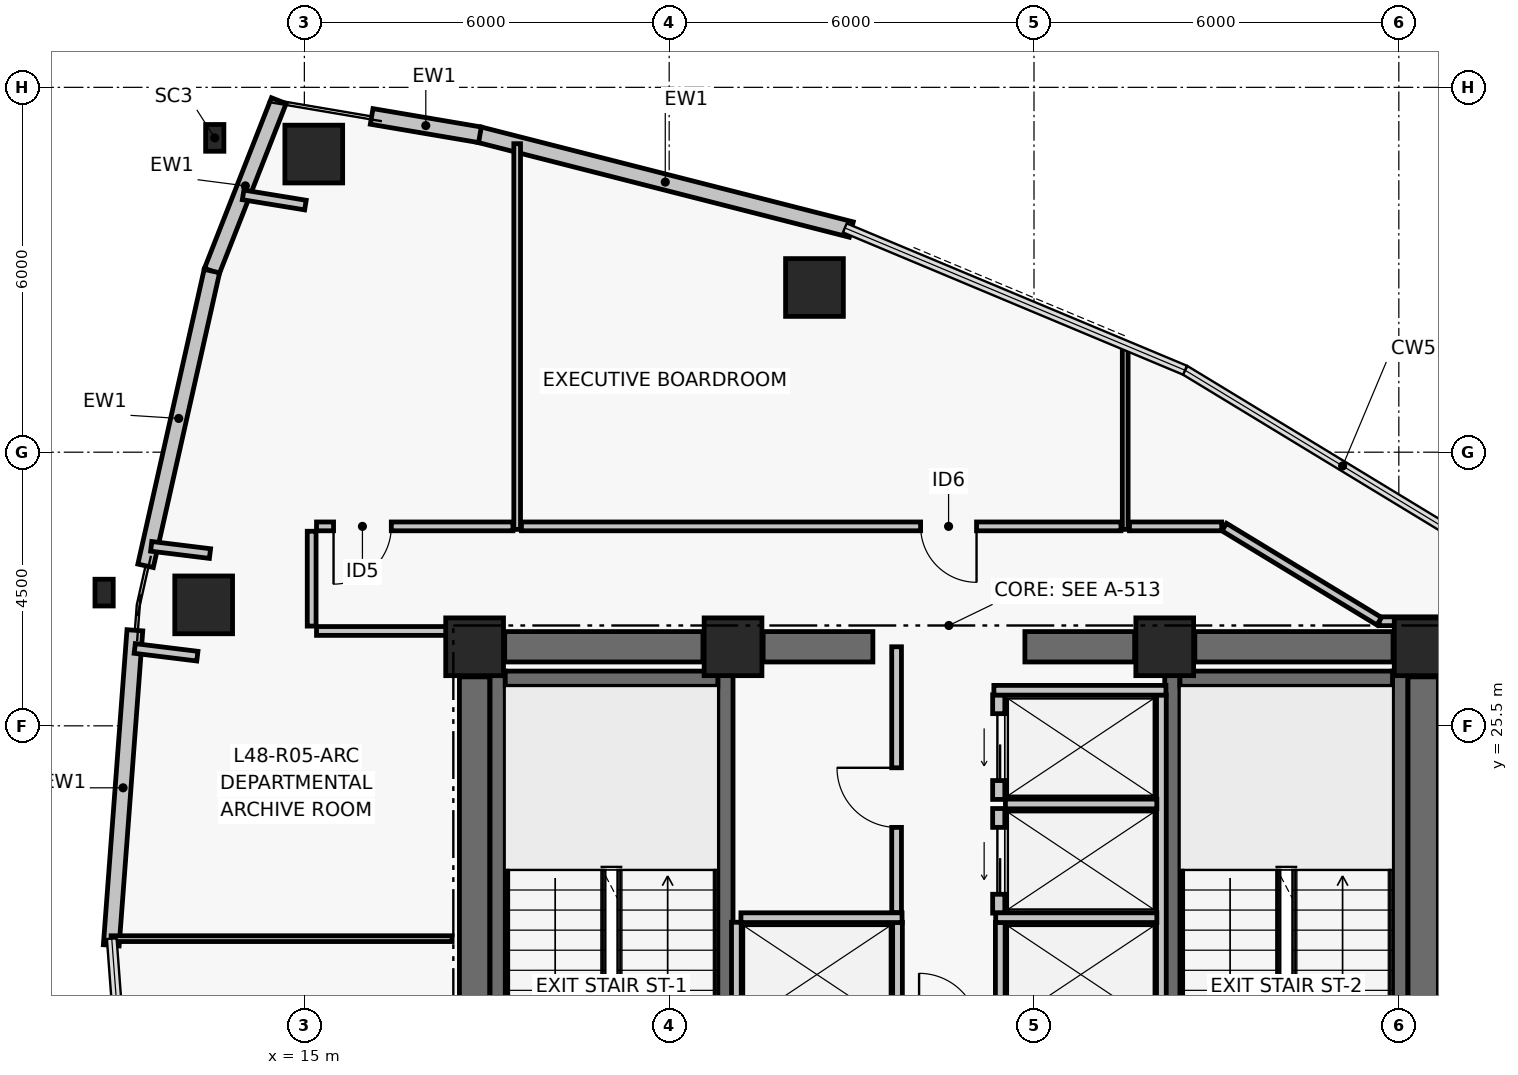
"""IFC4 building model, lengths in metres.
Left out: names, types, materials, properties, quantities, classifications, styles, units other than length and angle.
Written with IfcOpenShell. Run it as: python <this file> out.ifc"""

import sys

from ifc_helpers import new_model, si_unit, direction, frame, frame_2d, origin, origin_2d, place, context, subcontext, project, spatial, rectangle, hollow_rectangle, i_section, extrude, element, fill, save


model = new_model("IFC4")
c1 = context("Model", 3, precision=1e-05, world=origin(), true_north=direction((0.0, 1.0)))
c2 = subcontext(c1, "Body", "Model", "MODEL_VIEW")
j1 = project(units=[si_unit("LENGTHUNIT", "METRE"), si_unit("PLANEANGLEUNIT", "RADIAN")], contexts=[c1])
p1 = place(None, origin())
s1 = spatial("IfcSite", under=j1, at=p1, CompositionType="ELEMENT")
p2 = place(p1, origin())
s2 = spatial("IfcBuilding", under=s1, at=p2, CompositionType="ELEMENT")
p3 = place(p2, frame((0.0, 0.0, 191.52)))
s3 = spatial("IfcBuildingStorey", under=s2, at=p3, CompositionType="ELEMENT", Elevation=191.52)
for number, where, z_axis, x_axis in (
    (1, (17.8, 26.8, 0.0), (0.0, 0.0, 1.0), (1.0, 0.0, 0.0)),
    (2, (22.05, 26.8, 0.0), (0.0, 0.0, 1.0), (1.0, 0.0, 0.0)),
    (3, (29.15, 26.8, 0.0), (0.0, 0.0, 1.0), (1.0, 0.0, 0.0)),
    (4, (33.4, 26.8, 0.0), (0.0, 0.0, 1.0), (1.0, 0.0, 0.0)),
):
    element("IfcColumn", number, at=place(p3, frame(where, z_axis=z_axis, x_axis=x_axis)), inside=s3, PredefinedType="COLUMN", context=c2, shape_type="SweptSolid", body=[
        extrude(rectangle(XDim=0.95, YDim=0.95, at=origin_2d()), origin(), (0.0, 0.0, 1.0), 3.72),
    ])
p4 = place(p3, frame((18.295, 26.8, 0.0), z_axis=(0.0, 0.0, 1.0), x_axis=(1.0, 0.0, 0.0)))
e5 = element("IfcWall", 5, at=p4, inside=s3, PredefinedType="SHEAR", context=c2, shape_type="SweptSolid", body=[
    extrude(rectangle(XDim=3.26, YDim=0.5, at=frame_2d((1.63, 0.0))), origin(), (0.0, 0.0, 1.0), 3.44),
])
p5 = place(p3, frame((22.545, 26.8, 0.0), z_axis=(0.0, 0.0, 1.0), x_axis=(1.0, 0.0, 0.0)))
e6 = element("IfcWall", 6, at=p5, inside=s3, PredefinedType="SHEAR", context=c2, shape_type="SweptSolid", body=[
    extrude(rectangle(XDim=1.805, YDim=0.5, at=frame_2d((0.903, 0.0))), origin(), (0.0, 0.0, 1.0), 3.44),
])
p6 = place(p3, frame((26.85, 26.8, 0.0), z_axis=(0.0, 0.0, 1.0), x_axis=(1.0, 0.0, 0.0)))
e7 = element("IfcWall", 7, at=p6, inside=s3, PredefinedType="SHEAR", context=c2, shape_type="SweptSolid", body=[
    extrude(rectangle(XDim=1.805, YDim=0.5, at=frame_2d((0.902, 0.0))), origin(), (0.0, 0.0, 1.0), 3.44),
])
p7 = place(p3, frame((29.645, 26.8, 0.0), z_axis=(0.0, 0.0, 1.0), x_axis=(1.0, 0.0, 0.0)))
e8 = element("IfcWall", 8, at=p7, inside=s3, PredefinedType="SHEAR", context=c2, shape_type="SweptSolid", body=[
    extrude(rectangle(XDim=3.26, YDim=0.5, at=frame_2d((1.63, 0.0))), origin(), (0.0, 0.0, 1.0), 3.44),
])
for number, where, z_axis, x_axis in (
    (9, (17.8, 17.695, 0.0), (0.0, 0.0, 1.0), (0.0, 1.0, 0.0)),
    (10, (33.4, 17.695, 0.0), (0.0, 0.0, 1.0), (0.0, 1.0, 0.0)),
):
    element("IfcWall", number, at=place(p3, frame(where, z_axis=z_axis, x_axis=x_axis)), inside=s3, PredefinedType="SHEAR", context=c2, shape_type="SweptSolid", body=[
        extrude(rectangle(XDim=8.61, YDim=0.5, at=frame_2d((4.305, 0.0))), origin(), (0.0, 0.0, 1.0), 3.44),
    ])
p8 = place(p3, frame((18.179, 17.6, 0.0), z_axis=(0.0, 0.0, 1.0), x_axis=(0.0, 1.0, 0.0)))
e11 = element("IfcWall", 11, at=p8, inside=s3, PredefinedType="SHEAR", context=c2, shape_type="SweptSolid", body=[
    extrude(rectangle(XDim=8.8, YDim=0.25, at=frame_2d((4.4, 0.0))), origin(), (0.0, 0.0, 1.0), 3.44),
])
p9 = place(p3, frame((21.925, 17.6, 0.0), z_axis=(0.0, 0.0, 1.0), x_axis=(0.0, 1.0, 0.0)))
e12 = element("IfcWall", 12, at=p9, inside=s3, PredefinedType="SHEAR", context=c2, shape_type="SweptSolid", body=[
    extrude(rectangle(XDim=8.8, YDim=0.25, at=frame_2d((4.4, 0.0))), origin(), (0.0, 0.0, 1.0), 3.44),
])
p10 = place(p9, frame((0.35, 0.0, 0.0)))
e13 = element("IfcOpeningElement", 13, at=p10, cuts=e12, PredefinedType="OPENING", context=c2, shape_type="SweptSolid", body=[
    extrude(rectangle(XDim=1.05, YDim=2.08, at=frame_2d((0.525, 1.04))), frame((0.0, 0.135, 0.0), z_axis=(0.0, -1.0, 0.0), x_axis=(1.0, 0.0, 0.0)), (0.0, 0.0, 1.0), 0.27),
])
p11 = place(p3, frame((18.304, 26.275, 0.0), z_axis=(0.0, 0.0, 1.0), x_axis=(1.0, 0.0, 0.0)))
e14 = element("IfcWall", 14, at=p11, inside=s3, PredefinedType="SHEAR", context=c2, shape_type="SweptSolid", body=[
    extrude(rectangle(XDim=3.496, YDim=0.25, at=frame_2d((1.748, 0.0))), origin(), (0.0, 0.0, 1.0), 3.44),
])
p12 = place(p3, frame((29.275, 17.6, 0.0), z_axis=(0.0, 0.0, 1.0), x_axis=(0.0, 1.0, 0.0)))
e15 = element("IfcWall", 15, at=p12, inside=s3, PredefinedType="SHEAR", context=c2, shape_type="SweptSolid", body=[
    extrude(rectangle(XDim=8.8, YDim=0.25, at=frame_2d((4.4, 0.0))), origin(), (0.0, 0.0, 1.0), 3.44),
])
p13 = place(p12, frame((0.35, 0.0, 0.0)))
e16 = element("IfcOpeningElement", 16, at=p13, cuts=e15, PredefinedType="OPENING", context=c2, shape_type="SweptSolid", body=[
    extrude(rectangle(XDim=1.05, YDim=2.08, at=frame_2d((0.525, 1.04))), frame((0.0, 0.135, 0.0), z_axis=(0.0, -1.0, 0.0), x_axis=(1.0, 0.0, 0.0)), (0.0, 0.0, 1.0), 0.27),
])
p14 = place(p3, frame((33.021, 17.6, 0.0), z_axis=(0.0, 0.0, 1.0), x_axis=(0.0, 1.0, 0.0)))
e17 = element("IfcWall", 17, at=p14, inside=s3, PredefinedType="SHEAR", context=c2, shape_type="SweptSolid", body=[
    extrude(rectangle(XDim=8.8, YDim=0.25, at=frame_2d((4.4, 0.0))), origin(), (0.0, 0.0, 1.0), 3.44),
])
p15 = place(p3, frame((29.4, 26.275, 0.0), z_axis=(0.0, 0.0, 1.0), x_axis=(1.0, 0.0, 0.0)))
e18 = element("IfcWall", 18, at=p15, inside=s3, PredefinedType="SHEAR", context=c2, shape_type="SweptSolid", body=[
    extrude(rectangle(XDim=3.496, YDim=0.25, at=frame_2d((1.748, 0.0))), origin(), (0.0, 0.0, 1.0), 3.44),
])
for number, where, z_axis, x_axis in (
    (19, (23.389, 32.708, 0.0), (0.0, 0.0, 1.0), (1.0, 0.0, 0.0)),
    (20, (15.155, 34.903, 0.0), (0.0, 0.0, 1.0), (1.0, 0.0, 0.0)),
    (21, (13.344, 27.489, 0.0), (0.0, 0.0, 1.0), (1.0, 0.0, 0.0)),
):
    element("IfcColumn", number, at=place(p3, frame(where, z_axis=z_axis, x_axis=x_axis)), inside=s3, PredefinedType="COLUMN", context=c2, shape_type="SweptSolid", body=[
        extrude(hollow_rectangle(XDim=0.95, YDim=0.95, WallThickness=0.04, at=origin_2d()), origin(), (0.0, 0.0, 1.0), 3.72),
    ])
p16 = place(p3, frame((13.526, 35.169, 0.99), z_axis=(-0.984034614724, 0.160999980635, 0.075860946873), x_axis=(-0.16146525786, -0.98687839702, 0.0)))
e22 = element("IfcColumn", 22, at=p16, inside=s3, PredefinedType="COLUMN", context=c2, shape_type="SweptSolid", body=[
    extrude(i_section(OverallWidth=0.3, OverallDepth=0.44, WebThickness=0.011, FlangeThickness=0.018, at=origin_2d()), origin(), (0.0, 0.0, 1.0), 13.578),
])
p17 = place(p3, frame((11.706, 27.691, 0.99), z_axis=(-0.987092081771, 0.121459707467, 0.104387554656), x_axis=(-0.122126924057, -0.992514490786, 0.0)))
e23 = element("IfcColumn", 23, at=p17, inside=s3, PredefinedType="COLUMN", context=c2, shape_type="SweptSolid", body=[
    extrude(i_section(OverallWidth=0.3, OverallDepth=0.44, WebThickness=0.011, FlangeThickness=0.018, at=origin_2d()), origin(), (0.0, 0.0, 1.0), 9.867),
])
p18 = place(p3, frame((17.876, 35.222, 0.0), z_axis=(0.0, 0.0, 1.0), x_axis=(0.968976240439, -0.247153890246, 0.0)))
e24 = element("IfcWall", 24, at=p18, inside=s3, PredefinedType="PARTITIONING", context=c2, shape_type="SweptSolid", body=[
    extrude(rectangle(XDim=6.315, YDim=0.26, at=frame_2d((3.157, 0.0))), origin(), (0.0, 0.0, 1.0), 3.44),
])
p19 = place(p3, frame((16.107, 35.522, 0.0), z_axis=(0.0, 0.0, 1.0), x_axis=(0.985877723898, -0.167466753484, 0.0)))
e25 = element("IfcWall", 25, at=p19, inside=s3, PredefinedType="PARTITIONING", context=c2, shape_type="SweptSolid", body=[
    extrude(rectangle(XDim=1.806, YDim=0.26, at=frame_2d((0.903, 0.0))), origin(), (0.0, 0.0, 1.0), 3.44),
])
p20 = place(p3, frame((13.479, 32.979, 0.0), z_axis=(0.0, 0.0, 1.0), x_axis=(0.365609724313, 0.930768246927, 0.0)))
e26 = element("IfcWall", 26, at=p20, inside=s3, PredefinedType="PARTITIONING", context=c2, shape_type="SweptSolid", body=[
    extrude(rectangle(XDim=3.011, YDim=0.26, at=frame_2d((1.505, 0.0))), origin(), (0.0, 0.0, 1.0), 1.8),
])
p21 = place(p3, frame((12.389, 28.132, 0.0), z_axis=(0.0, 0.0, 1.0), x_axis=(0.219479451471, 0.975617122842, 0.0)))
e27 = element("IfcWall", 27, at=p21, inside=s3, PredefinedType="PARTITIONING", context=c2, shape_type="SweptSolid", body=[
    extrude(rectangle(XDim=4.968, YDim=0.26, at=frame_2d((2.484, 0.0))), origin(), (0.0, 0.0, 1.0), 3.44),
])
p22 = place(p3, frame((11.824, 21.89, 0.0), z_axis=(0.0, 0.0, 1.0), x_axis=(0.074763079383, 0.997201324689, 0.0)))
e28 = element("IfcWall", 28, at=p22, inside=s3, PredefinedType="PARTITIONING", context=c2, shape_type="SweptSolid", body=[
    extrude(rectangle(XDim=5.196, YDim=0.26, at=frame_2d((2.598, 0.0))), origin(), (0.0, 0.0, 1.0), 3.44),
])
p23 = place(p3, frame((26.42, 22.42, 0.0), z_axis=(0.0, 0.0, 1.0), x_axis=(0.0, 1.0, 0.0)))
e29 = element("IfcWall", 29, at=p23, inside=s3, PredefinedType="PARTITIONING", context=c2, shape_type="SweptSolid", body=[
    extrude(rectangle(XDim=1.72, YDim=0.2, at=frame_2d((0.86, 0.0))), origin(), (0.0, 0.0, 1.0), 3.44),
])
p24 = place(p23, frame((0.31, 0.0, 0.0)))
e30 = element("IfcOpeningElement", 30, at=p24, cuts=e29, PredefinedType="OPENING", context=c2, shape_type="SweptSolid", body=[
    extrude(rectangle(XDim=1.1, YDim=2.08, at=frame_2d((0.55, 1.04))), frame((0.0, 0.11, 0.0), z_axis=(0.0, -1.0, 0.0), x_axis=(1.0, 0.0, 0.0)), (0.0, 0.0, 1.0), 0.22),
])
p25 = place(p3, frame((26.42, 24.29, 0.0), z_axis=(0.0, 0.0, 1.0), x_axis=(0.0, 1.0, 0.0)))
e31 = element("IfcWall", 31, at=p25, inside=s3, PredefinedType="PARTITIONING", context=c2, shape_type="SweptSolid", body=[
    extrude(rectangle(XDim=1.72, YDim=0.2, at=frame_2d((0.86, 0.0))), origin(), (0.0, 0.0, 1.0), 3.44),
])
p26 = place(p25, frame((0.31, 0.0, 0.0)))
e32 = element("IfcOpeningElement", 32, at=p26, cuts=e31, PredefinedType="OPENING", context=c2, shape_type="SweptSolid", body=[
    extrude(rectangle(XDim=1.1, YDim=2.08, at=frame_2d((0.55, 1.04))), frame((0.0, 0.11, 0.0), z_axis=(0.0, -1.0, 0.0), x_axis=(1.0, 0.0, 0.0)), (0.0, 0.0, 1.0), 0.22),
])
for number, where, z_axis, x_axis in (
    (33, (22.105, 20.56, 0.0), (0.0, 0.0, 1.0), (0.0, 1.0, 0.0)),
    (34, (24.755, 20.56, 0.0), (0.0, 0.0, 1.0), (0.0, 1.0, 0.0)),
):
    element("IfcWall", number, at=place(p3, frame(where, z_axis=z_axis, x_axis=x_axis)), inside=s3, PredefinedType="PARTITIONING", context=c2, shape_type="SweptSolid", body=[
        extrude(rectangle(XDim=1.71, YDim=0.16, at=frame_2d((0.855, 0.0))), origin(), (0.0, 0.0, 1.0), 3.44),
    ])
p27 = place(p3, frame((22.18, 22.345, 0.0), z_axis=(0.0, 0.0, 1.0), x_axis=(1.0, 0.0, 0.0)))
e35 = element("IfcWall", 35, at=p27, inside=s3, PredefinedType="PARTITIONING", context=c2, shape_type="SweptSolid", body=[
    extrude(rectangle(XDim=2.65, YDim=0.16, at=frame_2d((1.325, 0.0))), origin(), (0.0, 0.0, 1.0), 3.44),
])
p28 = place(p3, frame((29.095, 20.56, 0.0), z_axis=(0.0, 0.0, 1.0), x_axis=(0.0, 1.0, 0.0)))
e36 = element("IfcWall", 36, at=p28, inside=s3, PredefinedType="PARTITIONING", context=c2, shape_type="SweptSolid", body=[
    extrude(rectangle(XDim=5.45, YDim=0.16, at=frame_2d((2.725, 0.0))), origin(), (0.0, 0.0, 1.0), 3.44),
])
p29 = place(p3, frame((26.445, 20.56, 0.0), z_axis=(0.0, 0.0, 1.0), x_axis=(0.0, 1.0, 0.0)))
e37 = element("IfcWall", 37, at=p29, inside=s3, PredefinedType="PARTITIONING", context=c2, shape_type="SweptSolid", body=[
    extrude(rectangle(XDim=1.71, YDim=0.16, at=frame_2d((0.855, 0.0))), origin(), (0.0, 0.0, 1.0), 3.44),
])
p30 = place(p3, frame((26.37, 22.345, 0.0), z_axis=(0.0, 0.0, 1.0), x_axis=(1.0, 0.0, 0.0)))
e38 = element("IfcWall", 38, at=p30, inside=s3, PredefinedType="PARTITIONING", context=c2, shape_type="SweptSolid", body=[
    extrude(rectangle(XDim=2.65, YDim=0.16, at=frame_2d((1.325, 0.0))), origin(), (0.0, 0.0, 1.0), 3.44),
])
p31 = place(p3, frame((26.53, 24.215, 0.0), z_axis=(0.0, 0.0, 1.0), x_axis=(1.0, 0.0, 0.0)))
e39 = element("IfcWall", 39, at=p31, inside=s3, PredefinedType="PARTITIONING", context=c2, shape_type="SweptSolid", body=[
    extrude(rectangle(XDim=2.49, YDim=0.16, at=frame_2d((1.245, 0.0))), origin(), (0.0, 0.0, 1.0), 3.44),
])
p32 = place(p3, frame((26.34, 26.085, 0.0), z_axis=(0.0, 0.0, 1.0), x_axis=(1.0, 0.0, 0.0)))
e40 = element("IfcWall", 40, at=p32, inside=s3, PredefinedType="PARTITIONING", context=c2, shape_type="SweptSolid", body=[
    extrude(rectangle(XDim=2.83, YDim=0.16, at=frame_2d((1.415, 0.0))), origin(), (0.0, 0.0, 1.0), 3.44),
])
p33 = place(p3, frame((24.74, 22.43, 0.0), z_axis=(0.0, 0.0, 1.0), x_axis=(0.0, 1.0, 0.0)))
e41 = element("IfcWall", 41, at=p33, inside=s3, PredefinedType="PARTITIONING", context=c2, shape_type="SweptSolid", body=[
    extrude(rectangle(XDim=4.37, YDim=0.16, at=frame_2d((2.185, 0.0))), origin(), (0.0, 0.0, 1.0), 2.57),
])
p34 = place(p33, frame((1.4, 0.0, 0.0)))
e42 = element("IfcOpeningElement", 42, at=p34, cuts=e41, PredefinedType="OPENING", context=c2, shape_type="SweptSolid", body=[
    extrude(rectangle(XDim=0.98, YDim=2.06, at=frame_2d((0.49, 1.03))), frame((0.0, 0.09, 0.0), z_axis=(0.0, -1.0, 0.0), x_axis=(1.0, 0.0, 0.0)), (0.0, 0.0, 1.0), 0.18),
])
p35 = place(p3, frame((33.74, 27.22, 0.0), z_axis=(0.0, 0.0, 1.0), x_axis=(-1.0, 0.0, 0.0)))
e43 = element("IfcWall", 43, at=p35, inside=s3, PredefinedType="PARTITIONING", context=c2, shape_type="SweptSolid", body=[
    extrude(rectangle(XDim=1.062, YDim=0.145, at=frame_2d((0.531, 0.0))), origin(), (0.0, 0.0, 1.0), 2.57),
])
p36 = place(p3, frame((32.677, 27.22, 0.0), z_axis=(0.0, 0.0, 1.0), x_axis=(-0.854662977584, 0.519183199601, 0.0)))
e44 = element("IfcWall", 44, at=p36, inside=s3, PredefinedType="PARTITIONING", context=c2, shape_type="SweptSolid", body=[
    extrude(rectangle(XDim=2.982, YDim=0.145, at=frame_2d((1.491, 0.0))), origin(), (0.0, 0.0, 1.0), 2.57),
])
p37 = place(p3, frame((30.087, 28.78, 0.0), z_axis=(0.0, 0.0, 1.0), x_axis=(-1.0, 0.0, 0.0)))
e45 = element("IfcWall", 45, at=p37, inside=s3, PredefinedType="PARTITIONING", context=c2, shape_type="SweptSolid", body=[
    extrude(rectangle(XDim=1.517, YDim=0.145, at=frame_2d((0.759, 0.0))), origin(), (0.0, 0.0, 1.0), 2.87),
])
p38 = place(p3, frame((28.43, 28.78, 0.0), z_axis=(0.0, 0.0, 1.0), x_axis=(-1.0, 0.0, 0.0)))
e46 = element("IfcWall", 46, at=p38, inside=s3, PredefinedType="PARTITIONING", context=c2, shape_type="SweptSolid", body=[
    extrude(rectangle(XDim=9.86, YDim=0.145, at=frame_2d((4.93, 0.0))), origin(), (0.0, 0.0, 1.0), 2.17),
])
p39 = place(p38, frame((2.375, 0.0, 0.0)))
e47 = element("IfcOpeningElement", 47, at=p39, cuts=e46, PredefinedType="OPENING", context=c2, shape_type="SweptSolid", body=[
    extrude(rectangle(XDim=0.92, YDim=2.05, at=frame_2d((0.46, 1.025))), frame((0.0, 0.083, 0.0), z_axis=(0.0, -1.0, 0.0), x_axis=(1.0, 0.0, 0.0)), (0.0, 0.0, 1.0), 0.165),
])
p40 = place(p3, frame((12.21, 26.772, 0.0), z_axis=(0.0, 0.0, 1.0), x_axis=(0.992518468601, -0.122094592369, 0.0)))
e48 = element("IfcWall", 48, at=p40, inside=s3, PredefinedType="PARTITIONING", context=c2, shape_type="SweptSolid", body=[
    extrude(rectangle(XDim=1.038, YDim=0.16, at=frame_2d((0.519, 0.0))), origin(), (0.0, 0.0, 1.0), 2.87),
])
p41 = place(p3, frame((13.448, 28.333, 0.0), z_axis=(0.0, 0.0, 1.0), x_axis=(-0.992488549389, 0.122337563047, 0.0)))
e49 = element("IfcWall", 49, at=p41, inside=s3, PredefinedType="PARTITIONING", context=c2, shape_type="SweptSolid", body=[
    extrude(rectangle(XDim=0.974, YDim=0.16, at=frame_2d((0.487, 0.0))), origin(), (0.0, 0.0, 1.0), 2.87),
])
p42 = place(p3, frame((13.993, 34.231, 0.0), z_axis=(0.0, 0.0, 1.0), x_axis=(0.986872539289, -0.161501056334, 0.0)))
e50 = element("IfcWall", 50, at=p42, inside=s3, PredefinedType="PARTITIONING", context=c2, shape_type="SweptSolid", body=[
    extrude(rectangle(XDim=1.039, YDim=0.16, at=frame_2d((0.519, 0.0))), origin(), (0.0, 0.0, 1.0), 2.87),
])
p43 = place(p3, frame((18.43, 28.78, 0.0), z_axis=(0.0, 0.0, 1.0), x_axis=(-1.0, 0.0, 0.0)))
e51 = element("IfcWall", 51, at=p43, inside=s3, PredefinedType="PARTITIONING", context=c2, shape_type="SweptSolid", body=[
    extrude(rectangle(XDim=3.23, YDim=0.145, at=frame_2d((1.615, 0.0))), origin(), (0.0, 0.0, 1.0), 2.17),
])
p44 = place(p43, frame((2.0, 0.0, 0.0)))
e52 = element("IfcOpeningElement", 52, at=p44, cuts=e51, PredefinedType="OPENING", context=c2, shape_type="SweptSolid", body=[
    extrude(rectangle(XDim=0.95, YDim=2.06, at=frame_2d((0.475, 1.03))), frame((0.0, 0.083, 0.0), z_axis=(0.0, -1.0, 0.0), x_axis=(1.0, 0.0, 0.0)), (0.0, 0.0, 1.0), 0.165),
])
p45 = place(p3, frame((15.12, 28.7, 0.0), z_axis=(0.0, 0.0, 1.0), x_axis=(0.0, -1.0, 0.0)))
e53 = element("IfcWall", 53, at=p45, inside=s3, PredefinedType="PARTITIONING", context=c2, shape_type="SweptSolid", body=[
    extrude(rectangle(XDim=1.56, YDim=0.145, at=frame_2d((0.78, 0.0))), origin(), (0.0, 0.0, 1.0), 2.17),
])
p46 = place(p3, frame((15.2, 27.06, 0.0), z_axis=(0.0, 0.0, 1.0), x_axis=(1.0, 0.0, 0.0)))
e54 = element("IfcWall", 54, at=p46, inside=s3, PredefinedType="PARTITIONING", context=c2, shape_type="SweptSolid", body=[
    extrude(rectangle(XDim=2.18, YDim=0.145, at=frame_2d((1.09, 0.0))), origin(), (0.0, 0.0, 1.0), 2.17),
])
p47 = place(p3, frame((18.5, 28.73, 0.0), z_axis=(0.0, 0.0, 1.0), x_axis=(0.0, 1.0, 0.0)))
e55 = element("IfcWall", 55, at=p47, inside=s3, PredefinedType="PARTITIONING", context=c2, shape_type="SweptSolid", body=[
    extrude(rectangle(XDim=6.343, YDim=0.11, at=frame_2d((3.172, 0.0))), origin(), (0.0, 0.0, 1.0), 2.87),
])
p48 = place(p3, frame((28.5, 28.73, 0.0), z_axis=(0.0, 0.0, 1.0), x_axis=(0.0, 1.0, 0.0)))
e56 = element("IfcWall", 56, at=p48, inside=s3, PredefinedType="PARTITIONING", context=c2, shape_type="SweptSolid", body=[
    extrude(rectangle(XDim=3.041, YDim=0.095, at=frame_2d((1.52, 0.0))), origin(), (0.0, 0.0, 1.0), 2.87),
])
p49 = place(p3, frame((11.822, 22.0, 0.0), z_axis=(0.0, 0.0, 1.0), x_axis=(1.0, 0.0, 0.0)))
e57 = element("IfcWall", 57, at=p49, inside=s3, PredefinedType="PARTITIONING", context=c2, shape_type="SweptSolid", body=[
    extrude(rectangle(XDim=5.608, YDim=0.095, at=frame_2d((2.804, 0.0))), origin(), (0.0, 0.0, 1.0), 2.57),
])
p50 = place(p24, origin())
e58 = element("IfcDoor", 58, at=p50, inside=s3, OperationType="DOUBLE_DOOR_SLIDING", PredefinedType="DOOR", context=c2, shape_type="SweptSolid", body=[
    extrude(rectangle(XDim=1.1, YDim=2.08, at=frame_2d((0.55, 1.04))), frame((0.0, 0.025, 0.0), z_axis=(0.0, -1.0, 0.0), x_axis=(1.0, 0.0, 0.0)), (0.0, 0.0, 1.0), 0.05),
])
fill(e30, e58)
p51 = place(p26, origin())
e59 = element("IfcDoor", 59, at=p51, inside=s3, OperationType="DOUBLE_DOOR_SLIDING", PredefinedType="DOOR", context=c2, shape_type="SweptSolid", body=[
    extrude(rectangle(XDim=1.1, YDim=2.08, at=frame_2d((0.55, 1.04))), frame((0.0, 0.025, 0.0), z_axis=(0.0, -1.0, 0.0), x_axis=(1.0, 0.0, 0.0)), (0.0, 0.0, 1.0), 0.05),
])
fill(e32, e59)
p52 = place(p34, origin())
e60 = element("IfcDoor", 60, at=p52, inside=s3, OperationType="SINGLE_SWING_RIGHT", PredefinedType="DOOR", context=c2, shape_type="SweptSolid", body=[
    extrude(rectangle(XDim=0.98, YDim=2.06, at=frame_2d((0.49, 1.03))), frame((0.0, 0.025, 0.0), z_axis=(0.0, -1.0, 0.0), x_axis=(1.0, 0.0, 0.0)), (0.0, 0.0, 1.0), 0.05),
])
fill(e42, e60)
p53 = place(p39, origin())
e61 = element("IfcDoor", 61, at=p53, inside=s3, OperationType="SINGLE_SWING_LEFT", PredefinedType="DOOR", context=c2, shape_type="SweptSolid", body=[
    extrude(rectangle(XDim=0.92, YDim=2.05, at=frame_2d((0.46, 1.025))), frame((0.0, 0.025, 0.0), z_axis=(0.0, -1.0, 0.0), x_axis=(1.0, 0.0, 0.0)), (0.0, 0.0, 1.0), 0.05),
])
fill(e47, e61)
p54 = place(p44, origin())
e62 = element("IfcDoor", 62, at=p54, inside=s3, OperationType="SINGLE_SWING_RIGHT", PredefinedType="DOOR", context=c2, shape_type="SweptSolid", body=[
    extrude(rectangle(XDim=0.95, YDim=2.06, at=frame_2d((0.475, 1.03))), frame((0.0, 0.025, 0.0), z_axis=(0.0, -1.0, 0.0), x_axis=(1.0, 0.0, 0.0)), (0.0, 0.0, 1.0), 0.05),
])
fill(e52, e62)
save(model, sys.argv[1])
